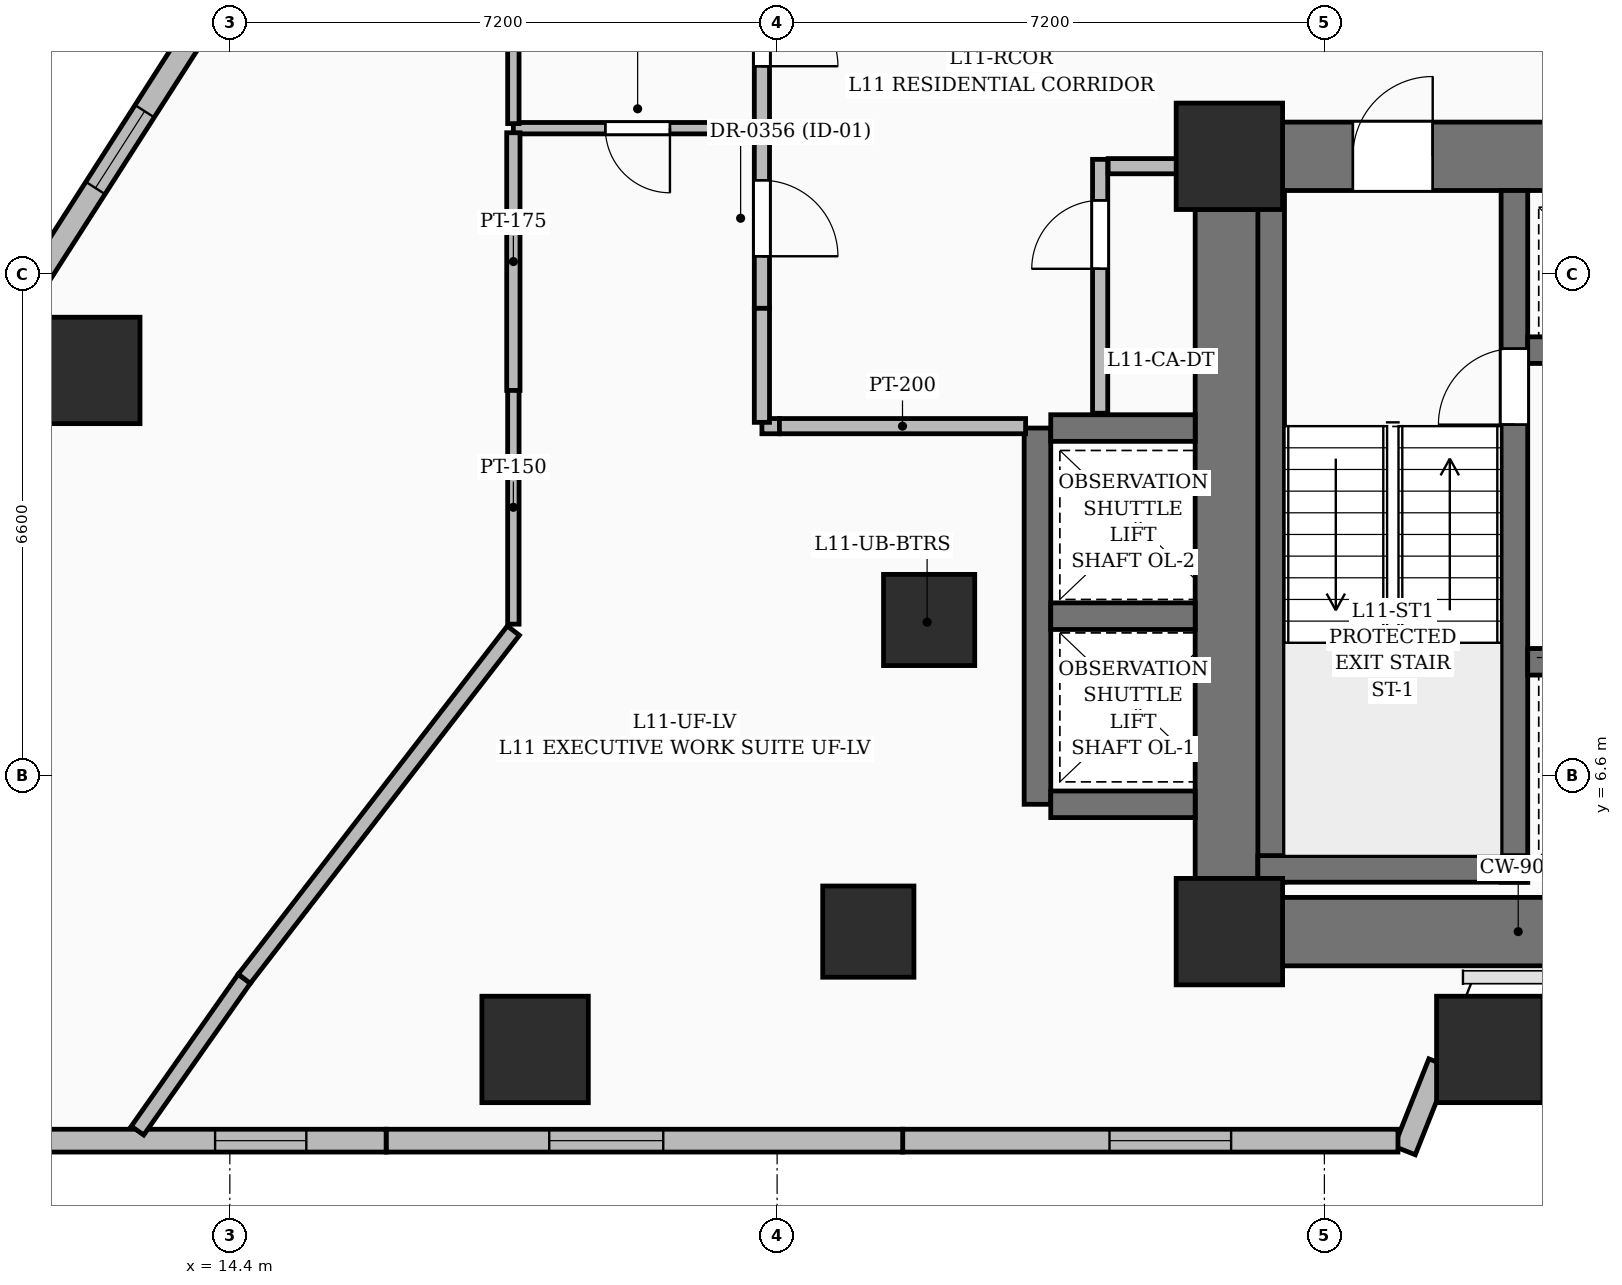
"""IFC4 building model, lengths in metres.
Left out: names, types, materials, properties, quantities, classifications, styles, units other than length and angle.
Written with IfcOpenShell. Run it as: python <this file> out.ifc"""

import sys

from ifc_helpers import new_model, si_unit, direction, frame, frame_2d, origin, origin_2d, place, context, subcontext, project, spatial, rectangle, extrude, element, fill, save


model = new_model("IFC4")
c1 = context("Model", 3, precision=1e-05, world=origin(), true_north=direction((0.0, 1.0)))
c2 = subcontext(c1, "Body", "Model", "MODEL_VIEW")
j1 = project(units=[si_unit("LENGTHUNIT", "METRE"), si_unit("PLANEANGLEUNIT", "RADIAN")], contexts=[c1])
p1 = place(None, origin())
s1 = spatial("IfcSite", under=j1, at=p1, CompositionType="ELEMENT")
p2 = place(p1, origin())
s2 = spatial("IfcBuilding", under=s1, at=p2, CompositionType="ELEMENT")
p3 = place(p2, frame((0.0, 0.0, 49.8)))
s3 = spatial("IfcBuildingStorey", under=s2, at=p3, CompositionType="ELEMENT", Elevation=49.8)
for number, where, z_axis, x_axis in (
    (1, (27.55, 4.55, 0.0), (0.0, 0.0, 1.0), (1.0, 0.0, 0.0)),
    (2, (27.55, 14.75, 0.0), (0.0, 0.0, 1.0), (1.0, 0.0, 0.0)),
):
    element("IfcColumn", number, at=place(p3, frame(where, z_axis=z_axis, x_axis=x_axis)), inside=s3, PredefinedType="COLUMN", context=c2, shape_type="SweptSolid", body=[
        extrude(rectangle(XDim=1.4, YDim=1.4, at=origin_2d()), origin(), (0.0, 0.0, 1.0), 3.6),
    ])
for number, where, z_axis, x_axis in (
    (3, (22.8, 4.55, 0.0), (0.0, 0.0, 1.0), (1.0, 0.0, 0.0)),
    (4, (23.6, 8.65, 0.0), (0.0, 0.0, 1.0), (1.0, 0.0, 0.0)),
):
    element("IfcColumn", number, at=place(p3, frame(where, z_axis=z_axis, x_axis=x_axis)), inside=s3, PredefinedType="COLUMN", context=c2, shape_type="SweptSolid", body=[
        extrude(rectangle(XDim=1.2, YDim=1.2, at=origin_2d()), origin(), (0.0, 0.0, 1.0), 3.6),
    ])
p4 = place(p3, frame((28.25, 4.55, 0.0), z_axis=(0.0, 0.0, 1.0), x_axis=(1.0, 0.0, 0.0)))
e5 = element("IfcWall", 5, at=p4, inside=s3, PredefinedType="SHEAR", context=c2, shape_type="SweptSolid", body=[
    extrude(rectangle(XDim=6.2, YDim=0.9, at=frame_2d((3.1, 0.0))), origin(), (0.0, 0.0, 1.0), 3.6),
])
p5 = place(p3, frame((28.25, 14.75, 0.0), z_axis=(0.0, 0.0, 1.0), x_axis=(1.0, 0.0, 0.0)))
e6 = element("IfcWall", 6, at=p5, inside=s3, PredefinedType="SHEAR", context=c2, shape_type="SweptSolid", body=[
    extrude(rectangle(XDim=6.2, YDim=0.9, at=frame_2d((3.1, 0.0))), origin(), (0.0, 0.0, 1.0), 3.6),
])
p6 = place(p5, frame((0.925, 0.0, 0.0)))
e7 = element("IfcOpeningElement", 7, at=p6, cuts=e6, PredefinedType="OPENING", context=c2, shape_type="SweptSolid", body=[
    extrude(rectangle(XDim=1.05, YDim=2.15, at=frame_2d((0.525, 1.075))), frame((0.0, 0.46, 0.0), z_axis=(0.0, -1.0, 0.0), x_axis=(1.0, 0.0, 0.0)), (0.0, 0.0, 1.0), 0.92),
])
p7 = place(p3, frame((27.55, 5.25, 0.0), z_axis=(0.0, 0.0, 1.0), x_axis=(0.0, 1.0, 0.0)))
e8 = element("IfcWall", 8, at=p7, inside=s3, PredefinedType="SHEAR", context=c2, shape_type="SweptSolid", body=[
    extrude(rectangle(XDim=8.8, YDim=0.9, at=frame_2d((4.4, 0.0))), origin(), (0.0, 0.0, 1.0), 3.6),
])
p8 = place(p3, frame((28.1, 5.2, 0.0), z_axis=(0.0, 0.0, 1.0), x_axis=(0.0, 1.0, 0.0)))
e9 = element("IfcWall", 9, at=p8, inside=s3, PredefinedType="SOLIDWALL", context=c2, shape_type="SweptSolid", body=[
    extrude(rectangle(XDim=9.1, YDim=0.35, at=frame_2d((4.55, 0.0))), origin(), (0.0, 0.0, 1.0), 3.6),
])
p9 = place(p3, frame((31.3, 5.2, 0.0), z_axis=(0.0, 0.0, 1.0), x_axis=(0.0, 1.0, 0.0)))
e10 = element("IfcWall", 10, at=p9, inside=s3, PredefinedType="SOLIDWALL", context=c2, shape_type="SweptSolid", body=[
    extrude(rectangle(XDim=9.1, YDim=0.35, at=frame_2d((4.55, 0.0))), origin(), (0.0, 0.0, 1.0), 3.6),
])
p10 = place(p9, frame((6.02, 0.0, 0.0)))
e11 = element("IfcOpeningElement", 11, at=p10, cuts=e10, PredefinedType="OPENING", context=c2, shape_type="SweptSolid", body=[
    extrude(rectangle(XDim=1.0, YDim=2.15, at=frame_2d((0.5, 1.075))), frame((0.0, 0.185, 0.0), z_axis=(0.0, -1.0, 0.0), x_axis=(1.0, 0.0, 0.0)), (0.0, 0.0, 1.0), 0.37),
])
p11 = place(p3, frame((27.925, 5.375, 0.0), z_axis=(0.0, 0.0, 1.0), x_axis=(1.0, 0.0, 0.0)))
e12 = element("IfcWall", 12, at=p11, inside=s3, PredefinedType="SOLIDWALL", context=c2, shape_type="SweptSolid", body=[
    extrude(rectangle(XDim=3.55, YDim=0.35, at=frame_2d((1.775, 0.0))), origin(), (0.0, 0.0, 1.0), 3.6),
])
p12 = place(p3, frame((31.475, 8.1, 0.0), z_axis=(0.0, 0.0, 1.0), x_axis=(1.0, 0.0, 0.0)))
e13 = element("IfcWall", 13, at=p12, inside=s3, PredefinedType="SOLIDWALL", context=c2, shape_type="SweptSolid", body=[
    extrude(rectangle(XDim=4.05, YDim=0.35, at=frame_2d((2.025, 0.0))), origin(), (0.0, 0.0, 1.0), 3.6),
])
p13 = place(p12, frame((0.575, 0.0, 0.0)))
e14 = element("IfcOpeningElement", 14, at=p13, cuts=e13, PredefinedType="OPENING", context=c2, shape_type="SweptSolid", body=[
    extrude(rectangle(XDim=1.3, YDim=2.25, at=frame_2d((0.65, 1.125))), frame((0.0, 0.185, 0.0), z_axis=(0.0, -1.0, 0.0), x_axis=(1.0, 0.0, 0.0)), (0.0, 0.0, 1.0), 0.37),
])
p14 = place(p12, frame((2.675, 0.0, 0.0)))
e15 = element("IfcOpeningElement", 15, at=p14, cuts=e13, PredefinedType="OPENING", context=c2, shape_type="SweptSolid", body=[
    extrude(rectangle(XDim=1.1, YDim=2.2, at=frame_2d((0.55, 1.1))), frame((0.0, 0.185, 0.0), z_axis=(0.0, -1.0, 0.0), x_axis=(1.0, 0.0, 0.0)), (0.0, 0.0, 1.0), 0.37),
])
p15 = place(p3, frame((31.475, 12.2, 0.0), z_axis=(0.0, 0.0, 1.0), x_axis=(1.0, 0.0, 0.0)))
e16 = element("IfcWall", 16, at=p15, inside=s3, PredefinedType="SOLIDWALL", context=c2, shape_type="SweptSolid", body=[
    extrude(rectangle(XDim=4.05, YDim=0.35, at=frame_2d((2.025, 0.0))), origin(), (0.0, 0.0, 1.0), 3.6),
])
p16 = place(p3, frame((25.025, 6.225, 0.0), z_axis=(0.0, 0.0, 1.0), x_axis=(0.0, 1.0, 0.0)))
e17 = element("IfcWall", 17, at=p16, inside=s3, PredefinedType="SOLIDWALL", context=c2, shape_type="SweptSolid", body=[
    extrude(rectangle(XDim=4.95, YDim=0.35, at=frame_2d((2.475, 0.0))), origin(), (0.0, 0.0, 1.0), 3.6),
])
for number, where, z_axis, x_axis in (
    (18, (25.2, 6.225, 0.0), (0.0, 0.0, 1.0), (1.0, 0.0, 0.0)),
    (19, (25.2, 8.7, 0.0), (0.0, 0.0, 1.0), (1.0, 0.0, 0.0)),
    (20, (25.2, 11.175, 0.0), (0.0, 0.0, 1.0), (1.0, 0.0, 0.0)),
):
    element("IfcWall", number, at=place(p3, frame(where, z_axis=z_axis, x_axis=x_axis)), inside=s3, PredefinedType="SOLIDWALL", context=c2, shape_type="SweptSolid", body=[
        extrude(rectangle(XDim=1.9, YDim=0.35, at=frame_2d((0.95, 0.0))), origin(), (0.0, 0.0, 1.0), 3.6),
    ])
for number, where, z_axis, x_axis in (
    (21, (18.416, 3.0, 0.0), (0.0, 0.0, 1.0), (1.0, 0.0, 0.0)),
    (22, (30.976, 3.0, 0.0), (0.0, 0.0, 1.0), (1.0, 0.0, 0.0)),
    (23, (12.518, 11.933, 0.0), (0.0, 0.0, 1.0), (1.0, 0.0, 0.0)),
):
    element("IfcColumn", number, at=place(p3, frame(where, z_axis=z_axis, x_axis=x_axis)), inside=s3, PredefinedType="COLUMN", context=c2, shape_type="SweptSolid", body=[
        extrude(rectangle(XDim=1.4, YDim=1.4, at=origin_2d()), origin(), (0.0, 0.0, 1.0), 3.6),
    ])
p17 = place(p3, frame((30.314, 2.821, 0.0), z_axis=(0.0, 0.0, 1.0), x_axis=(-0.369588763291, -0.929195429417, 0.0)))
e24 = element("IfcWall", 24, at=p17, inside=s3, PredefinedType="SOLIDWALL", context=c2, shape_type="SweptSolid", body=[
    extrude(rectangle(XDim=1.239, YDim=0.3, at=frame_2d((0.619, 0.0))), origin(), (0.0, 0.0, 1.0), 2.3),
])
p18 = place(p3, frame((29.768, 1.8, 0.0), z_axis=(0.0, 0.0, 1.0), x_axis=(-1.0, 0.0, 0.0)))
e25 = element("IfcWall", 25, at=p18, inside=s3, PredefinedType="SOLIDWALL", context=c2, shape_type="SweptSolid", body=[
    extrude(rectangle(XDim=6.516, YDim=0.3, at=frame_2d((3.258, 0.0))), origin(), (0.0, 0.0, 1.0), 3.35),
])
p19 = place(p18, frame((2.195, 0.0, 0.55)))
e26 = element("IfcOpeningElement", 26, at=p19, cuts=e25, PredefinedType="OPENING", context=c2, shape_type="SweptSolid", body=[
    extrude(rectangle(XDim=1.6, YDim=2.2, at=frame_2d((0.8, 1.1))), frame((0.0, 0.16, 0.0), z_axis=(0.0, -1.0, 0.0), x_axis=(1.0, 0.0, 0.0)), (0.0, 0.0, 1.0), 0.32),
])
p20 = place(p3, frame((23.252, 1.8, 0.0), z_axis=(0.0, 0.0, 1.0), x_axis=(-1.0, 0.0, 0.0)))
e27 = element("IfcWall", 27, at=p20, inside=s3, PredefinedType="SOLIDWALL", context=c2, shape_type="SweptSolid", body=[
    extrude(rectangle(XDim=6.796, YDim=0.3, at=frame_2d((3.398, 0.0))), origin(), (0.0, 0.0, 1.0), 3.35),
])
p21 = place(p20, frame((3.15, 0.0, 0.6)))
e28 = element("IfcOpeningElement", 28, at=p21, cuts=e27, PredefinedType="OPENING", context=c2, shape_type="SweptSolid", body=[
    extrude(rectangle(XDim=1.5, YDim=2.1, at=frame_2d((0.75, 1.05))), frame((0.0, 0.16, 0.0), z_axis=(0.0, -1.0, 0.0), x_axis=(1.0, 0.0, 0.0)), (0.0, 0.0, 1.0), 0.32),
])
p22 = place(p3, frame((16.456, 1.8, 0.0), z_axis=(0.0, 0.0, 1.0), x_axis=(-1.0, 0.0, 0.0)))
e29 = element("IfcWall", 29, at=p22, inside=s3, PredefinedType="SOLIDWALL", context=c2, shape_type="SweptSolid", body=[
    extrude(rectangle(XDim=6.796, YDim=0.3, at=frame_2d((3.398, 0.0))), origin(), (0.0, 0.0, 1.0), 3.35),
])
p23 = place(p22, frame((1.05, 0.0, 0.8)))
e30 = element("IfcOpeningElement", 30, at=p23, cuts=e29, PredefinedType="OPENING", context=c2, shape_type="SweptSolid", body=[
    extrude(rectangle(XDim=1.2, YDim=1.8, at=frame_2d((0.6, 0.9))), frame((0.0, 0.16, 0.0), z_axis=(0.0, -1.0, 0.0), x_axis=(1.0, 0.0, 0.0)), (0.0, 0.0, 1.0), 0.32),
])
p24 = place(p3, frame((10.851, 11.555, 0.0), z_axis=(0.0, 0.0, 1.0), x_axis=(0.539526045631, 0.841968910403, 0.0)))
e31 = element("IfcWall", 31, at=p24, inside=s3, PredefinedType="SOLIDWALL", context=c2, shape_type="SweptSolid", body=[
    extrude(rectangle(XDim=6.526, YDim=0.3, at=frame_2d((3.263, 0.0))), origin(), (0.0, 0.0, 1.0), 3.35),
])
p25 = place(p24, frame((3.3, 0.0, 0.8)))
e32 = element("IfcOpeningElement", 32, at=p25, cuts=e31, PredefinedType="OPENING", context=c2, shape_type="SweptSolid", body=[
    extrude(rectangle(XDim=1.2, YDim=1.8, at=frame_2d((0.6, 0.9))), frame((0.0, 0.16, 0.0), z_axis=(0.0, -1.0, 0.0), x_axis=(1.0, 0.0, 0.0)), (0.0, 0.0, 1.0), 0.32),
])
p26 = place(p3, frame((25.85, 11.37, 0.0), z_axis=(0.0, 0.0, 1.0), x_axis=(0.0, 1.0, 0.0)))
e33 = element("IfcWall", 33, at=p26, inside=s3, PredefinedType="PARTITIONING", context=c2, shape_type="SweptSolid", body=[
    extrude(rectangle(XDim=3.34, YDim=0.2, at=frame_2d((1.67, 0.0))), origin(), (0.0, 0.0, 1.0), 3.35),
])
p27 = place(p26, frame((1.9, 0.0, 0.0)))
e34 = element("IfcOpeningElement", 34, at=p27, cuts=e33, PredefinedType="OPENING", context=c2, shape_type="SweptSolid", body=[
    extrude(rectangle(XDim=0.9, YDim=2.1, at=frame_2d((0.45, 1.05))), frame((0.0, 0.11, 0.0), z_axis=(0.0, -1.0, 0.0), x_axis=(1.0, 0.0, 0.0)), (0.0, 0.0, 1.0), 0.22),
])
p28 = place(p3, frame((25.955, 14.62, 0.0), z_axis=(0.0, 0.0, 1.0), x_axis=(1.0, 0.0, 0.0)))
e35 = element("IfcWall", 35, at=p28, inside=s3, PredefinedType="PARTITIONING", context=c2, shape_type="SweptSolid", body=[
    extrude(rectangle(XDim=1.13, YDim=0.2, at=frame_2d((0.565, 0.0))), origin(), (0.0, 0.0, 1.0), 3.35),
])
p29 = place(p3, frame((21.4, 11.2, 0.0), z_axis=(0.0, 0.0, 1.0), x_axis=(1.0, 0.0, 0.0)))
e36 = element("IfcWall", 36, at=p29, inside=s3, PredefinedType="PARTITIONING", context=c2, shape_type="SweptSolid", body=[
    extrude(rectangle(XDim=0.23, YDim=0.2, at=frame_2d((0.115, 0.0))), origin(), (0.0, 0.0, 1.0), 2.911),
])
p30 = place(p3, frame((21.63, 11.2, 0.0), z_axis=(0.0, 0.0, 1.0), x_axis=(1.0, 0.0, 0.0)))
e37 = element("IfcWall", 37, at=p30, inside=s3, PredefinedType="PARTITIONING", context=c2, shape_type="SweptSolid", body=[
    extrude(rectangle(XDim=3.239, YDim=0.2, at=frame_2d((1.62, 0.0))), origin(), (0.0, 0.0, 1.0), 2.911),
])
p31 = place(p3, frame((21.4, 15.12, 0.0), z_axis=(0.0, 0.0, 1.0), x_axis=(0.0, -1.0, 0.0)))
e38 = element("IfcWall", 38, at=p31, inside=s3, PredefinedType="PARTITIONING", context=c2, shape_type="SweptSolid", body=[
    extrude(rectangle(XDim=2.37, YDim=0.2, at=frame_2d((1.185, 0.0))), origin(), (0.0, 0.0, 1.0), 2.911),
])
p32 = place(p31, frame((0.685, 0.0, 0.0)))
e39 = element("IfcOpeningElement", 39, at=p32, cuts=e38, PredefinedType="OPENING", context=c2, shape_type="SweptSolid", body=[
    extrude(rectangle(XDim=1.0, YDim=2.2, at=frame_2d((0.5, 1.1))), frame((0.0, 0.11, 0.0), z_axis=(0.0, -1.0, 0.0), x_axis=(1.0, 0.0, 0.0)), (0.0, 0.0, 1.0), 0.22),
])
p33 = place(p3, frame((21.4, 17.75, 0.0), z_axis=(0.0, 0.0, 1.0), x_axis=(0.0, -1.0, 0.0)))
e40 = element("IfcWall", 40, at=p33, inside=s3, PredefinedType="PARTITIONING", context=c2, shape_type="SweptSolid", body=[
    extrude(rectangle(XDim=2.63, YDim=0.2, at=frame_2d((1.315, 0.0))), origin(), (0.0, 0.0, 1.0), 2.911),
])
p34 = place(p33, frame((0.815, 0.0, 0.0)))
e41 = element("IfcOpeningElement", 41, at=p34, cuts=e40, PredefinedType="OPENING", context=c2, shape_type="SweptSolid", body=[
    extrude(rectangle(XDim=1.0, YDim=2.2, at=frame_2d((0.5, 1.1))), frame((0.0, 0.11, 0.0), z_axis=(0.0, -1.0, 0.0), x_axis=(1.0, 0.0, 0.0)), (0.0, 0.0, 1.0), 0.22),
])
p35 = place(p3, frame((13.185, 1.932, 0.0), z_axis=(0.0, 0.0, 1.0), x_axis=(0.575218554017, 0.81799976474, 0.0)))
e42 = element("IfcWall", 42, at=p35, inside=s3, PredefinedType="PARTITIONING", context=c2, shape_type="SweptSolid", body=[
    extrude(rectangle(XDim=2.443, YDim=0.2, at=frame_2d((1.221, 0.0))), origin(), (0.0, 0.0, 1.0), 3.35),
])
p36 = place(p3, frame((18.13, 8.51, 0.0), z_axis=(0.0, 0.0, 1.0), x_axis=(-0.611517119948, -0.791231200099, 0.0)))
e43 = element("IfcWall", 43, at=p36, inside=s3, PredefinedType="PARTITIONING", context=c2, shape_type="SweptSolid", body=[
    extrude(rectangle(XDim=5.789, YDim=0.2, at=frame_2d((2.894, 0.0))), origin(), (0.0, 0.0, 1.0), 2.37),
])
p37 = place(p3, frame((21.315, 15.12, 0.0), z_axis=(0.0, 0.0, 1.0), x_axis=(-1.0, 0.0, 0.0)))
e44 = element("IfcWall", 44, at=p37, inside=s3, PredefinedType="PARTITIONING", context=c2, shape_type="SweptSolid", body=[
    extrude(rectangle(XDim=3.185, YDim=0.15, at=frame_2d((1.593, 0.0))), origin(), (0.0, 0.0, 1.0), 2.911),
])
p38 = place(p37, frame((1.125, 0.0, 0.0)))
e45 = element("IfcOpeningElement", 45, at=p38, cuts=e44, PredefinedType="OPENING", context=c2, shape_type="SweptSolid", body=[
    extrude(rectangle(XDim=0.85, YDim=2.1, at=frame_2d((0.425, 1.05))), frame((0.0, 0.085, 0.0), z_axis=(0.0, -1.0, 0.0), x_axis=(1.0, 0.0, 0.0)), (0.0, 0.0, 1.0), 0.17),
])
p39 = place(p3, frame((18.13, 15.06, 0.0), z_axis=(0.0, 0.0, 1.0), x_axis=(0.0, -1.0, 0.0)))
e46 = element("IfcWall", 46, at=p39, inside=s3, PredefinedType="PARTITIONING", context=c2, shape_type="SweptSolid", body=[
    extrude(rectangle(XDim=3.39, YDim=0.175, at=frame_2d((1.695, 0.0))), origin(), (0.0, 0.0, 1.0), 2.911),
])
p40 = place(p3, frame((18.13, 17.75, 0.0), z_axis=(0.0, 0.0, 1.0), x_axis=(0.0, -1.0, 0.0)))
e47 = element("IfcWall", 47, at=p40, inside=s3, PredefinedType="PARTITIONING", context=c2, shape_type="SweptSolid", body=[
    extrude(rectangle(XDim=2.57, YDim=0.15, at=frame_2d((1.285, 0.0))), origin(), (0.0, 0.0, 1.0), 3.35),
])
p41 = place(p3, frame((21.4, 12.75, 0.0), z_axis=(0.0, 0.0, 1.0), x_axis=(0.0, -1.0, 0.0)))
e48 = element("IfcWall", 48, at=p41, inside=s3, PredefinedType="PARTITIONING", context=c2, shape_type="SweptSolid", body=[
    extrude(rectangle(XDim=1.5, YDim=0.2, at=frame_2d((0.75, 0.0))), origin(), (0.0, 0.0, 1.0), 3.35),
])
p42 = place(p3, frame((18.13, 11.67, 0.0), z_axis=(0.0, 0.0, 1.0), x_axis=(0.0, -1.0, 0.0)))
e49 = element("IfcWall", 49, at=p42, inside=s3, PredefinedType="PARTITIONING", context=c2, shape_type="SweptSolid", body=[
    extrude(rectangle(XDim=3.075, YDim=0.15, at=frame_2d((1.538, 0.0))), origin(), (0.0, 0.0, 1.0), 1.12),
])
p43 = place(p19, origin())
e50 = element("IfcWindow", 50, at=p43, inside=s3, PartitioningType="SINGLE_PANEL", PredefinedType="WINDOW", context=c2, shape_type="SweptSolid", body=[
    extrude(rectangle(XDim=1.6, YDim=2.2, at=frame_2d((0.8, 1.1))), frame((0.0, 0.03, 0.0), z_axis=(0.0, -1.0, 0.0), x_axis=(1.0, 0.0, 0.0)), (0.0, 0.0, 1.0), 0.06),
])
fill(e26, e50)
p44 = place(p21, origin())
e51 = element("IfcWindow", 51, at=p44, inside=s3, PartitioningType="SINGLE_PANEL", PredefinedType="WINDOW", context=c2, shape_type="SweptSolid", body=[
    extrude(rectangle(XDim=1.5, YDim=2.1, at=frame_2d((0.75, 1.05))), frame((0.0, 0.03, 0.0), z_axis=(0.0, -1.0, 0.0), x_axis=(1.0, 0.0, 0.0)), (0.0, 0.0, 1.0), 0.06),
])
fill(e28, e51)
p45 = place(p23, origin())
e52 = element("IfcWindow", 52, at=p45, inside=s3, PartitioningType="SINGLE_PANEL", PredefinedType="WINDOW", context=c2, shape_type="SweptSolid", body=[
    extrude(rectangle(XDim=1.2, YDim=1.8, at=frame_2d((0.6, 0.9))), frame((0.0, 0.03, 0.0), z_axis=(0.0, -1.0, 0.0), x_axis=(1.0, 0.0, 0.0)), (0.0, 0.0, 1.0), 0.06),
])
fill(e30, e52)
p46 = place(p25, origin())
e53 = element("IfcWindow", 53, at=p46, inside=s3, PartitioningType="SINGLE_PANEL", PredefinedType="WINDOW", context=c2, shape_type="SweptSolid", body=[
    extrude(rectangle(XDim=1.2, YDim=1.8, at=frame_2d((0.6, 0.9))), frame((0.0, 0.03, 0.0), z_axis=(0.0, -1.0, 0.0), x_axis=(1.0, 0.0, 0.0)), (0.0, 0.0, 1.0), 0.06),
])
fill(e32, e53)
p47 = place(p6, origin())
e54 = element("IfcDoor", 54, at=p47, inside=s3, OperationType="SINGLE_SWING_RIGHT", PredefinedType="DOOR", context=c2, shape_type="SweptSolid", body=[
    extrude(rectangle(XDim=1.05, YDim=2.15, at=frame_2d((0.525, 1.075))), frame((0.0, 0.025, 0.0), z_axis=(0.0, -1.0, 0.0), x_axis=(1.0, 0.0, 0.0)), (0.0, 0.0, 1.0), 0.05),
])
fill(e7, e54)
p48 = place(p10, origin())
e55 = element("IfcDoor", 55, at=p48, inside=s3, OperationType="SINGLE_SWING_LEFT", PredefinedType="DOOR", context=c2, shape_type="SweptSolid", body=[
    extrude(rectangle(XDim=1.0, YDim=2.15, at=frame_2d((0.5, 1.075))), frame((0.0, 0.025, 0.0), z_axis=(0.0, -1.0, 0.0), x_axis=(1.0, 0.0, 0.0)), (0.0, 0.0, 1.0), 0.05),
])
fill(e11, e55)
p49 = place(p27, origin())
e56 = element("IfcDoor", 56, at=p49, inside=s3, OperationType="SINGLE_SWING_LEFT", PredefinedType="DOOR", context=c2, shape_type="SweptSolid", body=[
    extrude(rectangle(XDim=0.9, YDim=2.1, at=frame_2d((0.45, 1.05))), frame((0.0, 0.025, 0.0), z_axis=(0.0, -1.0, 0.0), x_axis=(1.0, 0.0, 0.0)), (0.0, 0.0, 1.0), 0.05),
])
fill(e34, e56)
p50 = place(p32, origin())
e57 = element("IfcDoor", 57, at=p50, inside=s3, OperationType="SINGLE_SWING_RIGHT", PredefinedType="DOOR", context=c2, shape_type="SweptSolid", body=[
    extrude(rectangle(XDim=1.0, YDim=2.2, at=frame_2d((0.5, 1.1))), frame((0.0, 0.025, 0.0), z_axis=(0.0, -1.0, 0.0), x_axis=(1.0, 0.0, 0.0)), (0.0, 0.0, 1.0), 0.05),
])
fill(e39, e57)
p51 = place(p38, origin())
e58 = element("IfcDoor", 58, at=p51, inside=s3, OperationType="SINGLE_SWING_LEFT", PredefinedType="DOOR", context=c2, shape_type="SweptSolid", body=[
    extrude(rectangle(XDim=0.85, YDim=2.1, at=frame_2d((0.425, 1.05))), frame((0.0, 0.025, 0.0), z_axis=(0.0, -1.0, 0.0), x_axis=(1.0, 0.0, 0.0)), (0.0, 0.0, 1.0), 0.05),
])
fill(e45, e58)
p52 = place(p34, origin())
e59 = element("IfcDoor", 59, at=p52, inside=s3, OperationType="SINGLE_SWING_RIGHT", PredefinedType="DOOR", context=c2, shape_type="SweptSolid", body=[
    extrude(rectangle(XDim=1.0, YDim=2.2, at=frame_2d((0.5, 1.1))), frame((0.0, 0.025, 0.0), z_axis=(0.0, -1.0, 0.0), x_axis=(1.0, 0.0, 0.0)), (0.0, 0.0, 1.0), 0.05),
])
fill(e41, e59)
save(model, sys.argv[1])
